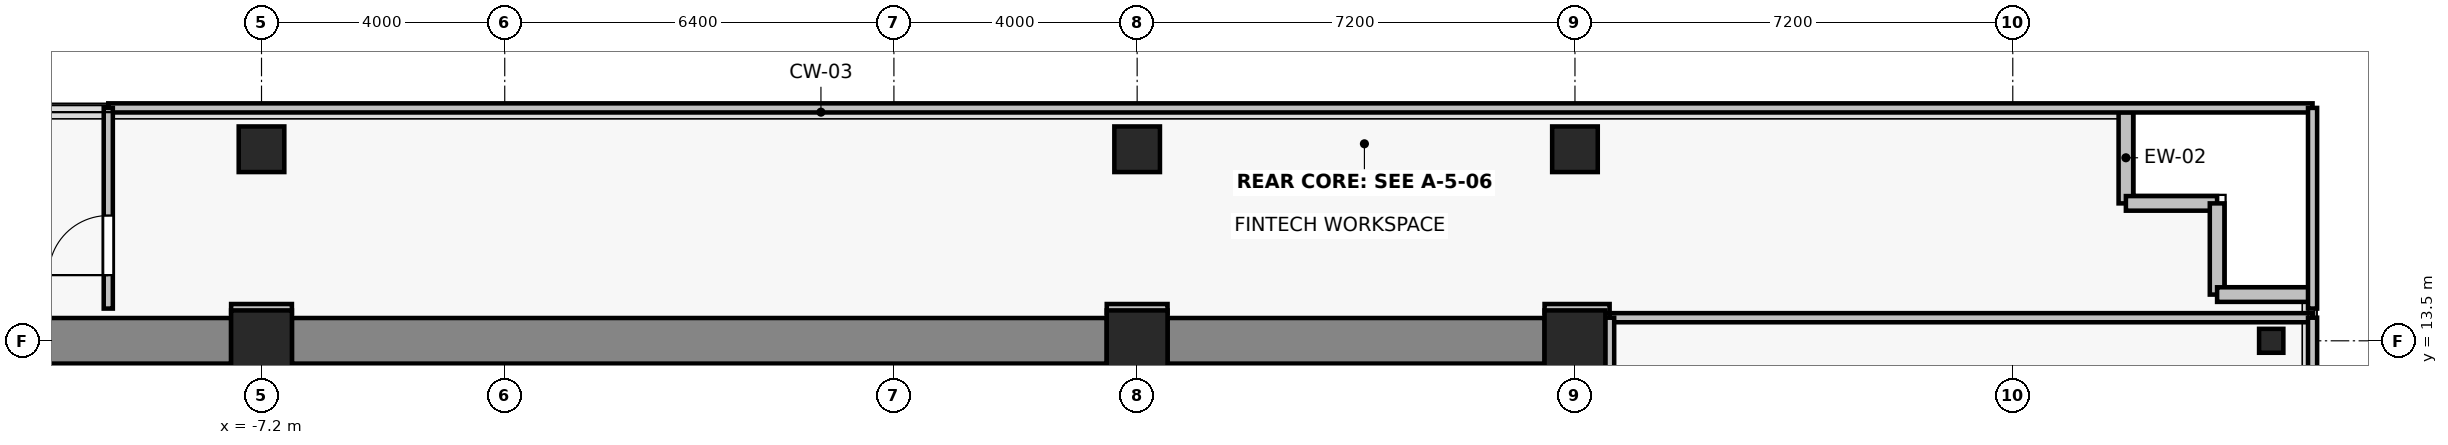
"""IFC4 building model, lengths in metres.
Left out: names, types, materials, properties, quantities, classifications, styles, units other than length and angle.
Written with IfcOpenShell. Run it as: python <this file> out.ifc"""

import sys

from ifc_helpers import new_model, si_unit, direction, frame, frame_2d, origin, origin_2d, place, context, subcontext, project, spatial, rectangle, i_section, extrude, source, transform, mapped, element, fill, save


model = new_model("IFC4")
c1 = context("Model", 3, precision=1e-05, world=origin(), true_north=direction((0.0, 1.0)))
c2 = subcontext(c1, "Body", "Model", "MODEL_VIEW")
j1 = project(units=[si_unit("LENGTHUNIT", "METRE"), si_unit("PLANEANGLEUNIT", "RADIAN")], contexts=[c1])
p1 = place(None, origin())
s1 = spatial("IfcSite", under=j1, at=p1, CompositionType="ELEMENT")
p2 = place(p1, origin())
s2 = spatial("IfcBuilding", under=s1, at=p2, CompositionType="ELEMENT")
p3 = place(p2, frame((0.0, 0.0, 175.9)))
s3 = spatial("IfcBuildingStorey", under=s2, at=p3, CompositionType="ELEMENT", Elevation=175.9)
for number, where, z_axis, x_axis in (
    (1, (-7.2, 13.5, 0.0), (0.0, 0.0, 1.0), (1.0, 0.0, 0.0)),
    (2, (7.2, 13.5, 0.0), (0.0, 0.0, 1.0), (1.0, 0.0, 0.0)),
    (3, (14.4, 13.5, 0.0), (0.0, 0.0, 1.0), (1.0, 0.0, 0.0)),
):
    element("IfcColumn", number, at=place(p3, frame(where, z_axis=z_axis, x_axis=x_axis)), inside=s3, PredefinedType="COLUMN", context=c2, shape_type="SweptSolid", body=[
        extrude(rectangle(XDim=1.0, YDim=1.0, at=origin_2d()), origin(), (0.0, 0.0, 1.0), 3.3),
    ])
for number, where, z_axis, x_axis in (
    (4, (-7.2, 16.65, 0.0), (0.0, 0.0, 1.0), (1.0, 0.0, 0.0)),
    (5, (7.2, 16.65, 0.0), (0.0, 0.0, 1.0), (1.0, 0.0, 0.0)),
    (6, (14.4, 16.65, 0.0), (0.0, 0.0, 1.0), (1.0, 0.0, 0.0)),
):
    element("IfcColumn", number, at=place(p3, frame(where, z_axis=z_axis, x_axis=x_axis)), inside=s3, PredefinedType="COLUMN", context=c2, shape_type="SweptSolid", body=[
        extrude(rectangle(XDim=0.75, YDim=0.75, at=origin_2d()), origin(), (0.0, 0.0, 1.0), 3.3),
    ])
p4 = place(p3, frame((25.85, 13.5, 0.0), z_axis=(0.0, 0.0, 1.0), x_axis=(1.0, 0.0, 0.0)))
e7 = element("IfcColumn", 7, at=p4, inside=s3, PredefinedType="COLUMN", context=c2, shape_type="SweptSolid", body=[
    extrude(i_section(OverallWidth=0.399, OverallDepth=0.394, WebThickness=0.023, FlangeThickness=0.037, FilletRadius=0.015, at=origin_2d()), origin(), (0.0, 0.0, 1.0), 3.3),
])
p5 = place(p3, frame((-13.9, 13.5, 0.0), z_axis=(0.0, 0.0, 1.0), x_axis=(1.0, 0.0, 0.0)))
e8 = element("IfcWall", 8, at=p5, inside=s3, PredefinedType="SHEAR", context=c2, shape_type="SweptSolid", body=[
    extrude(rectangle(XDim=6.2, YDim=0.75, at=frame_2d((3.1, 0.0))), origin(), (0.0, 0.0, 1.0), 3.075),
])
p6 = place(p3, frame((-6.7, 13.5, 0.0), z_axis=(0.0, 0.0, 1.0), x_axis=(1.0, 0.0, 0.0)))
e9 = element("IfcWall", 9, at=p6, inside=s3, PredefinedType="SHEAR", context=c2, shape_type="SweptSolid", body=[
    extrude(rectangle(XDim=13.4, YDim=0.75, at=frame_2d((6.7, 0.0))), origin(), (0.0, 0.0, 1.0), 3.075),
])
p7 = place(p3, frame((7.7, 13.5, 0.0), z_axis=(0.0, 0.0, 1.0), x_axis=(1.0, 0.0, 0.0)))
e10 = element("IfcWall", 10, at=p7, inside=s3, PredefinedType="SHEAR", context=c2, shape_type="SweptSolid", body=[
    extrude(rectangle(XDim=6.2, YDim=0.75, at=frame_2d((3.1, 0.0))), origin(), (0.0, 0.0, 1.0), 3.075),
])
for number, where, z_axis, x_axis in (
    (11, (23.46, 15.76, 0.0), (0.0, 0.0, 1.0), (0.0, 1.0, 0.0)),
    (12, (24.96, 15.76, 0.0), (0.0, 0.0, 1.0), (-1.0, 0.0, 0.0)),
    (13, (24.96, 14.26, 0.0), (0.0, 0.0, 1.0), (0.0, 1.0, 0.0)),
    (14, (26.46, 14.26, 0.0), (0.0, 0.0, 1.0), (-1.0, 0.0, 0.0)),
):
    element("IfcWall", number, at=place(p3, frame(where, z_axis=z_axis, x_axis=x_axis)), inside=s3, PredefinedType="SOLIDWALL", context=c2, shape_type="SweptSolid", body=[
        extrude(rectangle(XDim=1.5, YDim=0.24, at=frame_2d((0.75, 0.0))), origin(), (0.0, 0.0, 1.0), 3.075),
    ])
p8 = place(p3, frame((14.97, 13.88, 0.0), z_axis=(0.0, 0.0, 1.0), x_axis=(1.0, 0.0, 0.0)))
e15 = element("IfcWall", 15, at=p8, inside=s3, PredefinedType="PARTITIONING", context=c2, shape_type="SweptSolid", body=[
    extrude(rectangle(XDim=11.56, YDim=0.15, at=frame_2d((5.78, 0.0))), origin(), (0.0, 0.0, 1.0), 3.075),
])
p9 = place(p3, frame((14.97, 13.0, 0.0), z_axis=(0.0, 0.0, 1.0), x_axis=(0.0, 1.0, 0.0)))
e16 = element("IfcWall", 16, at=p9, inside=s3, PredefinedType="PARTITIONING", context=c2, shape_type="SweptSolid", body=[
    extrude(rectangle(XDim=0.88, YDim=0.15, at=frame_2d((0.44, 0.0))), origin(), (0.0, 0.0, 1.0), 2.565),
])
p10 = place(p3, frame((26.53, 13.88, 0.0), z_axis=(0.0, 0.0, 1.0), x_axis=(0.0, -1.0, 0.0)))
e17 = element("IfcWall", 17, at=p10, inside=s3, PredefinedType="PARTITIONING", context=c2, shape_type="SweptSolid", body=[
    extrude(rectangle(XDim=15.65, YDim=0.15, at=frame_2d((7.825, 0.0))), origin(), (0.0, 0.0, 1.0), 3.075),
])
for number, where, z_axis, x_axis in (
    (18, (-6.7, 14.03, 0.0), (0.0, 0.0, 1.0), (-1.0, 0.0, 0.0)),
    (19, (7.7, 14.03, 0.0), (0.0, 0.0, 1.0), (-1.0, 0.0, 0.0)),
):
    element("IfcWall", number, at=place(p3, frame(where, z_axis=z_axis, x_axis=x_axis)), inside=s3, PredefinedType="PARTITIONING", context=c2, shape_type="SweptSolid", body=[
        extrude(rectangle(XDim=1.0, YDim=0.15, at=frame_2d((0.5, 0.0))), origin(), (0.0, 0.0, 1.0), 2.565),
    ])
p11 = place(p3, frame((14.97, 14.03, 0.0), z_axis=(0.0, 0.0, 1.0), x_axis=(-1.0, 0.0, 0.0)))
e20 = element("IfcWall", 20, at=p11, inside=s3, PredefinedType="PARTITIONING", context=c2, shape_type="SweptSolid", body=[
    extrude(rectangle(XDim=1.07, YDim=0.15, at=frame_2d((0.535, 0.0))), origin(), (0.0, 0.0, 1.0), 2.565),
])
p12 = place(p3, frame((-9.72, 17.33, 0.0), z_axis=(0.0, 0.0, 1.0), x_axis=(1.0, 0.0, 0.0)))
e21 = element("IfcWall", 21, at=p12, inside=s3, PredefinedType="PARTITIONING", context=c2, shape_type="SweptSolid", body=[
    extrude(rectangle(XDim=36.25, YDim=0.15, at=frame_2d((18.125, 0.0))), origin(), (0.0, 0.0, 1.0), 3.075),
])
p13 = place(p3, frame((-9.72, 14.03, 0.0), z_axis=(0.0, 0.0, 1.0), x_axis=(0.0, 1.0, 0.0)))
e22 = element("IfcWall", 22, at=p13, inside=s3, PredefinedType="PARTITIONING", context=c2, shape_type="SweptSolid", body=[
    extrude(rectangle(XDim=3.3, YDim=0.15, at=frame_2d((1.65, 0.0))), origin(), (0.0, 0.0, 1.0), 2.565),
])
p14 = place(p13, frame((0.55, 0.0, 0.0)))
e23 = element("IfcOpeningElement", 23, at=p14, cuts=e22, PredefinedType="OPENING", context=c2, shape_type="SweptSolid", body=[
    extrude(rectangle(XDim=0.98, YDim=2.15, at=frame_2d((0.49, 1.075))), frame((0.0, 0.085, 0.0), z_axis=(0.0, -1.0, 0.0), x_axis=(1.0, 0.0, 0.0)), (0.0, 0.0, 1.0), 0.17),
])
p15 = place(p3, frame((26.53, 17.33, 0.0), z_axis=(0.0, 0.0, 1.0), x_axis=(0.0, -1.0, 0.0)))
e24 = element("IfcWall", 24, at=p15, inside=s3, PredefinedType="PARTITIONING", context=c2, shape_type="SweptSolid", body=[
    extrude(rectangle(XDim=3.3, YDim=0.15, at=frame_2d((1.65, 0.0))), origin(), (0.0, 0.0, 1.0), 3.075),
])
m1 = source(origin(), c2, "Body", "SweptSolid", [
    extrude(rectangle(XDim=0.98, YDim=2.15, at=frame_2d((0.49, 1.075))), frame((0.0, 0.025, 0.0), z_axis=(0.0, -1.0, 0.0), x_axis=(1.0, 0.0, 0.0)), (0.0, 0.0, 1.0), 0.05),
])
p16 = place(p14, origin())
e25 = element("IfcDoor", 25, at=p16, inside=s3, OperationType="SINGLE_SWING_LEFT", PredefinedType="DOOR", context=c2, shape_type="MappedRepresentation", body=[
    mapped(m1, transform((0.0, 0.0, 0.0), x_axis=(1.0, 0.0, 0.0), y_axis=(0.0, 1.0, 0.0), z_axis=(0.0, 0.0, 1.0), scale=1.0)),
])
fill(e23, e25)
save(model, sys.argv[1])
